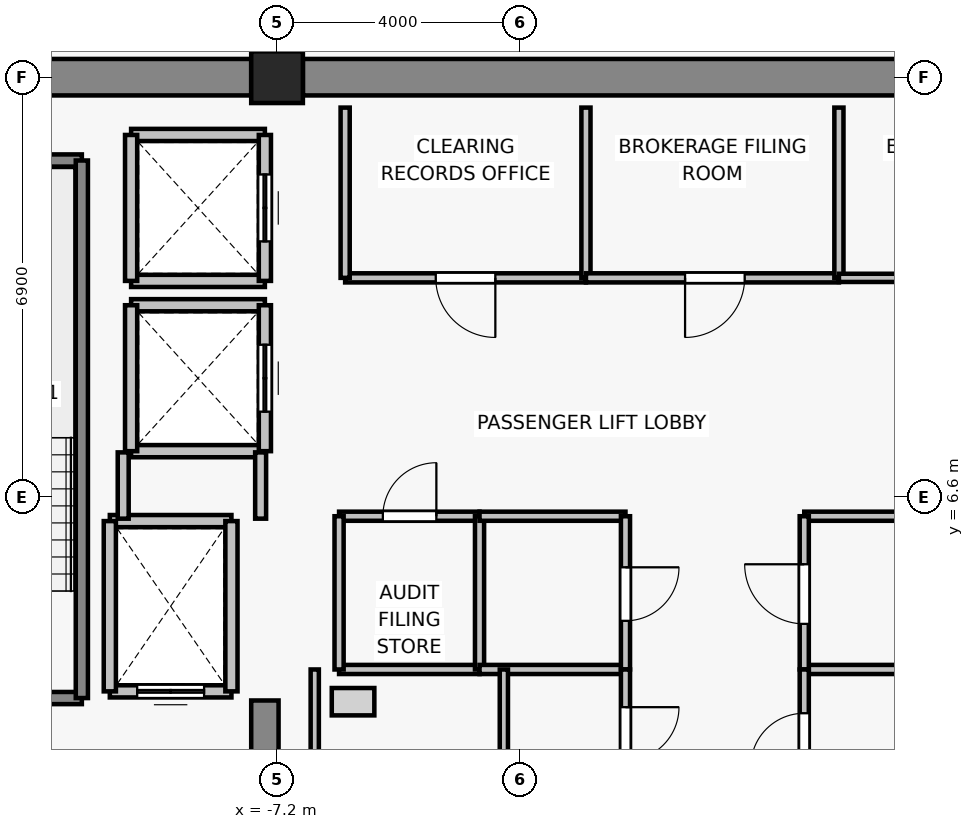
"""IFC4 building model, lengths in metres.
Left out: names, types, materials, properties, quantities, classifications, styles, units other than length and angle.
Written with IfcOpenShell. Run it as: python <this file> out.ifc"""

import sys

from ifc_helpers import new_model, si_unit, direction, frame, frame_2d, origin, origin_2d, place, context, subcontext, project, spatial, rectangle, extrude, source, transform, mapped, element, fill, save


model = new_model("IFC4")
c1 = context("Model", 3, precision=1e-05, world=origin(), true_north=direction((0.0, 1.0)))
c2 = subcontext(c1, "Body", "Model", "MODEL_VIEW")
j1 = project(units=[si_unit("LENGTHUNIT", "METRE"), si_unit("PLANEANGLEUNIT", "RADIAN")], contexts=[c1])
p1 = place(None, origin())
s1 = spatial("IfcSite", under=j1, at=p1, CompositionType="ELEMENT")
p2 = place(p1, origin())
s2 = spatial("IfcBuilding", under=s1, at=p2, CompositionType="ELEMENT")
p3 = place(p2, frame((0.0, 0.0, 225.4)))
s3 = spatial("IfcBuildingStorey", under=s2, at=p3, CompositionType="ELEMENT", Elevation=225.4)
p4 = place(p3, frame((-7.2, 13.5, 0.0), z_axis=(0.0, 0.0, 1.0), x_axis=(1.0, 0.0, 0.0)))
e1 = element("IfcColumn", 1, at=p4, inside=s3, PredefinedType="COLUMN", context=c2, shape_type="SweptSolid", body=[
    extrude(rectangle(XDim=0.85, YDim=0.85, at=origin_2d()), origin(), (0.0, 0.0, 1.0), 3.3),
])
p5 = place(p3, frame((-13.975, 13.5, 0.0), z_axis=(0.0, 0.0, 1.0), x_axis=(1.0, 0.0, 0.0)))
e2 = element("IfcWall", 2, at=p5, inside=s3, PredefinedType="SHEAR", context=c2, shape_type="SweptSolid", body=[
    extrude(rectangle(XDim=6.35, YDim=0.6, at=frame_2d((3.175, 0.0))), origin(), (0.0, 0.0, 1.0), 3.075),
])
p6 = place(p3, frame((-6.775, 13.5, 0.0), z_axis=(0.0, 0.0, 1.0), x_axis=(1.0, 0.0, 0.0)))
e3 = element("IfcWall", 3, at=p6, inside=s3, PredefinedType="SHEAR", context=c2, shape_type="SweptSolid", body=[
    extrude(rectangle(XDim=13.55, YDim=0.6, at=frame_2d((6.775, 0.0))), origin(), (0.0, 0.0, 1.0), 3.075),
])
p7 = place(p3, frame((-7.4, -0.9, 0.0), z_axis=(0.0, 0.0, 1.0), x_axis=(0.0, 1.0, 0.0)))
e4 = element("IfcWall", 4, at=p7, inside=s3, PredefinedType="SHEAR", context=c2, shape_type="SweptSolid", body=[
    extrude(rectangle(XDim=4.15, YDim=0.45, at=frame_2d((2.075, 0.0))), origin(), (0.0, 0.0, 1.0), 3.075),
])
p8 = place(p3, frame((-7.95, 3.4, 0.0), z_axis=(0.0, 0.0, 1.0), x_axis=(-1.0, 0.0, 0.0)))
e5 = element("IfcWall", 5, at=p8, inside=s3, PredefinedType="SOLIDWALL", context=c2, shape_type="SweptSolid", body=[
    extrude(rectangle(XDim=2.0, YDim=0.2, at=frame_2d((1.0, 0.0))), origin(), (0.0, 0.0, 1.0), 3.075),
])
p9 = place(p8, frame((0.45, 0.0, 0.0)))
e6 = element("IfcOpeningElement", 6, at=p9, cuts=e5, PredefinedType="OPENING", context=c2, shape_type="SweptSolid", body=[
    extrude(rectangle(XDim=1.1, YDim=2.2, at=frame_2d((0.55, 1.1))), frame((0.0, 0.11, 0.0), z_axis=(0.0, -1.0, 0.0), x_axis=(1.0, 0.0, 0.0)), (0.0, 0.0, 1.0), 0.22),
])
p10 = place(p3, frame((-9.95, 6.2, 0.0), z_axis=(0.0, 0.0, 1.0), x_axis=(1.0, 0.0, 0.0)))
e7 = element("IfcWall", 7, at=p10, inside=s3, PredefinedType="SOLIDWALL", context=c2, shape_type="SweptSolid", body=[
    extrude(rectangle(XDim=2.0, YDim=0.2, at=frame_2d((1.0, 0.0))), origin(), (0.0, 0.0, 1.0), 3.075),
])
for number, where, z_axis, x_axis in (
    (8, (-9.95, 3.4, 0.0), (0.0, 0.0, 1.0), (0.0, 1.0, 0.0)),
    (9, (-7.95, 6.2, 0.0), (0.0, 0.0, 1.0), (0.0, -1.0, 0.0)),
):
    element("IfcWall", number, at=place(p3, frame(where, z_axis=z_axis, x_axis=x_axis)), inside=s3, PredefinedType="SOLIDWALL", context=c2, shape_type="SweptSolid", body=[
        extrude(rectangle(XDim=2.8, YDim=0.2, at=frame_2d((1.4, 0.0))), origin(), (0.0, 0.0, 1.0), 3.075),
    ])
for number, where, z_axis, x_axis in (
    (10, (-7.4, 7.35, 0.0), (0.0, 0.0, 1.0), (-1.0, 0.0, 0.0)),
    (11, (-9.6, 9.75, 0.0), (0.0, 0.0, 1.0), (1.0, 0.0, 0.0)),
):
    element("IfcWall", number, at=place(p3, frame(where, z_axis=z_axis, x_axis=x_axis)), inside=s3, PredefinedType="SOLIDWALL", context=c2, shape_type="SweptSolid", body=[
        extrude(rectangle(XDim=2.2, YDim=0.2, at=frame_2d((1.1, 0.0))), origin(), (0.0, 0.0, 1.0), 2.615),
    ])
p11 = place(p3, frame((-9.6, 7.35, 0.0), z_axis=(0.0, 0.0, 1.0), x_axis=(0.0, 1.0, 0.0)))
e12 = element("IfcWall", 12, at=p11, inside=s3, PredefinedType="SOLIDWALL", context=c2, shape_type="SweptSolid", body=[
    extrude(rectangle(XDim=2.4, YDim=0.2, at=frame_2d((1.2, 0.0))), origin(), (0.0, 0.0, 1.0), 3.075),
])
p12 = place(p3, frame((-7.4, 9.75, 0.0), z_axis=(0.0, 0.0, 1.0), x_axis=(0.0, -1.0, 0.0)))
e13 = element("IfcWall", 13, at=p12, inside=s3, PredefinedType="SOLIDWALL", context=c2, shape_type="SweptSolid", body=[
    extrude(rectangle(XDim=2.4, YDim=0.2, at=frame_2d((1.2, 0.0))), origin(), (0.0, 0.0, 1.0), 2.615),
])
p13 = place(p12, frame((0.65, 0.0, 0.0)))
e14 = element("IfcOpeningElement", 14, at=p13, cuts=e13, PredefinedType="OPENING", context=c2, shape_type="SweptSolid", body=[
    extrude(rectangle(XDim=1.1, YDim=2.2, at=frame_2d((0.55, 1.1))), frame((0.0, 0.11, 0.0), z_axis=(0.0, -1.0, 0.0), x_axis=(1.0, 0.0, 0.0)), (0.0, 0.0, 1.0), 0.22),
])
for number, where, z_axis, x_axis in (
    (15, (-7.4, 10.15, 0.0), (0.0, 0.0, 1.0), (-1.0, 0.0, 0.0)),
    (16, (-9.6, 12.55, 0.0), (0.0, 0.0, 1.0), (1.0, 0.0, 0.0)),
):
    element("IfcWall", number, at=place(p3, frame(where, z_axis=z_axis, x_axis=x_axis)), inside=s3, PredefinedType="SOLIDWALL", context=c2, shape_type="SweptSolid", body=[
        extrude(rectangle(XDim=2.2, YDim=0.2, at=frame_2d((1.1, 0.0))), origin(), (0.0, 0.0, 1.0), 2.615),
    ])
p14 = place(p3, frame((-9.6, 10.15, 0.0), z_axis=(0.0, 0.0, 1.0), x_axis=(0.0, 1.0, 0.0)))
e17 = element("IfcWall", 17, at=p14, inside=s3, PredefinedType="SOLIDWALL", context=c2, shape_type="SweptSolid", body=[
    extrude(rectangle(XDim=2.4, YDim=0.2, at=frame_2d((1.2, 0.0))), origin(), (0.0, 0.0, 1.0), 3.075),
])
p15 = place(p3, frame((-7.4, 12.55, 0.0), z_axis=(0.0, 0.0, 1.0), x_axis=(0.0, -1.0, 0.0)))
e18 = element("IfcWall", 18, at=p15, inside=s3, PredefinedType="SOLIDWALL", context=c2, shape_type="SweptSolid", body=[
    extrude(rectangle(XDim=2.4, YDim=0.2, at=frame_2d((1.2, 0.0))), origin(), (0.0, 0.0, 1.0), 2.615),
])
p16 = place(p15, frame((0.65, 0.0, 0.0)))
e19 = element("IfcOpeningElement", 19, at=p16, cuts=e18, PredefinedType="OPENING", context=c2, shape_type="SweptSolid", body=[
    extrude(rectangle(XDim=1.1, YDim=2.2, at=frame_2d((0.55, 1.1))), frame((0.0, 0.11, 0.0), z_axis=(0.0, -1.0, 0.0), x_axis=(1.0, 0.0, 0.0)), (0.0, 0.0, 1.0), 0.22),
])
p17 = place(p3, frame((-10.41, 3.29, 0.0), z_axis=(0.0, 0.0, 1.0), x_axis=(-1.0, 0.0, 0.0)))
e20 = element("IfcWall", 20, at=p17, inside=s3, PredefinedType="SOLIDWALL", context=c2, shape_type="SweptSolid", body=[
    extrude(rectangle(XDim=3.52, YDim=0.2, at=frame_2d((1.76, 0.0))), origin(), (0.0, 0.0, 1.0), 3.075),
])
p18 = place(p17, frame((1.165, 0.0, 0.0)))
e21 = element("IfcOpeningElement", 21, at=p18, cuts=e20, PredefinedType="OPENING", context=c2, shape_type="SweptSolid", body=[
    extrude(rectangle(XDim=1.15, YDim=2.15, at=frame_2d((0.575, 1.075))), frame((0.0, 0.11, 0.0), z_axis=(0.0, -1.0, 0.0), x_axis=(1.0, 0.0, 0.0)), (0.0, 0.0, 1.0), 0.22),
])
p19 = place(p3, frame((-13.93, 12.13, 0.0), z_axis=(0.0, 0.0, 1.0), x_axis=(1.0, 0.0, 0.0)))
e22 = element("IfcWall", 22, at=p19, inside=s3, PredefinedType="SOLIDWALL", context=c2, shape_type="SweptSolid", body=[
    extrude(rectangle(XDim=3.52, YDim=0.2, at=frame_2d((1.76, 0.0))), origin(), (0.0, 0.0, 1.0), 3.075),
])
p20 = place(p3, frame((-10.41, 12.13, 0.0), z_axis=(0.0, 0.0, 1.0), x_axis=(0.0, -1.0, 0.0)))
e23 = element("IfcWall", 23, at=p20, inside=s3, PredefinedType="SOLIDWALL", context=c2, shape_type="SweptSolid", body=[
    extrude(rectangle(XDim=8.84, YDim=0.2, at=frame_2d((4.42, 0.0))), origin(), (0.0, 0.0, 1.0), 3.075),
])
p21 = place(p3, frame((-9.73, 6.24, 0.0), z_axis=(0.0, 0.0, 1.0), x_axis=(0.0, 1.0, 0.0)))
e24 = element("IfcWall", 24, at=p21, inside=s3, PredefinedType="PARTITIONING", context=c2, shape_type="SweptSolid", body=[
    extrude(rectangle(XDim=1.09, YDim=0.18, at=frame_2d((0.545, 0.0))), origin(), (0.0, 0.0, 1.0), 3.075),
])
p22 = place(p3, frame((-7.47, 7.33, 0.0), z_axis=(0.0, 0.0, 1.0), x_axis=(0.0, -1.0, 0.0)))
e25 = element("IfcWall", 25, at=p22, inside=s3, PredefinedType="PARTITIONING", context=c2, shape_type="SweptSolid", body=[
    extrude(rectangle(XDim=1.09, YDim=0.18, at=frame_2d((0.545, 0.0))), origin(), (0.0, 0.0, 1.0), 2.615),
])
p23 = place(p3, frame((-2.12, 10.2, 0.0), z_axis=(0.0, 0.0, 1.0), x_axis=(-1.0, 0.0, 0.0)))
e26 = element("IfcWall", 26, at=p23, inside=s3, PredefinedType="PARTITIONING", context=c2, shape_type="SweptSolid", body=[
    extrude(rectangle(XDim=3.96, YDim=0.15, at=frame_2d((1.98, 0.0))), origin(), (0.0, 0.0, 1.0), 3.075),
])
p24 = place(p23, frame((1.49, 0.0, 0.0)))
e27 = element("IfcOpeningElement", 27, at=p24, cuts=e26, PredefinedType="OPENING", context=c2, shape_type="SweptSolid", body=[
    extrude(rectangle(XDim=0.98, YDim=2.15, at=frame_2d((0.49, 1.075))), frame((0.0, 0.085, 0.0), z_axis=(0.0, -1.0, 0.0), x_axis=(1.0, 0.0, 0.0)), (0.0, 0.0, 1.0), 0.17),
])
for number, where, z_axis, x_axis in (
    (28, (-6.08, 10.2, 0.0), (0.0, 0.0, 1.0), (0.0, 1.0, 0.0)),
    (29, (-2.12, 13.0, 0.0), (0.0, 0.0, 1.0), (0.0, -1.0, 0.0)),
):
    element("IfcWall", number, at=place(p3, frame(where, z_axis=z_axis, x_axis=x_axis)), inside=s3, PredefinedType="PARTITIONING", context=c2, shape_type="SweptSolid", body=[
        extrude(rectangle(XDim=2.8, YDim=0.15, at=frame_2d((1.4, 0.0))), origin(), (0.0, 0.0, 1.0), 3.075),
    ])
p25 = place(p3, frame((2.04, 10.2, 0.0), z_axis=(0.0, 0.0, 1.0), x_axis=(-1.0, 0.0, 0.0)))
e30 = element("IfcWall", 30, at=p25, inside=s3, PredefinedType="PARTITIONING", context=c2, shape_type="SweptSolid", body=[
    extrude(rectangle(XDim=4.16, YDim=0.15, at=frame_2d((2.08, 0.0))), origin(), (0.0, 0.0, 1.0), 3.075),
])
p26 = place(p25, frame((1.55, 0.0, 0.0)))
e31 = element("IfcOpeningElement", 31, at=p26, cuts=e30, PredefinedType="OPENING", context=c2, shape_type="SweptSolid", body=[
    extrude(rectangle(XDim=0.98, YDim=2.15, at=frame_2d((0.49, 1.075))), frame((0.0, 0.085, 0.0), z_axis=(0.0, -1.0, 0.0), x_axis=(1.0, 0.0, 0.0)), (0.0, 0.0, 1.0), 0.17),
])
p27 = place(p3, frame((2.04, 13.0, 0.0), z_axis=(0.0, 0.0, 1.0), x_axis=(0.0, -1.0, 0.0)))
e32 = element("IfcWall", 32, at=p27, inside=s3, PredefinedType="PARTITIONING", context=c2, shape_type="SweptSolid", body=[
    extrude(rectangle(XDim=2.8, YDim=0.15, at=frame_2d((1.4, 0.0))), origin(), (0.0, 0.0, 1.0), 3.075),
])
p28 = place(p3, frame((6.08, 10.2, 0.0), z_axis=(0.0, 0.0, 1.0), x_axis=(-1.0, 0.0, 0.0)))
e33 = element("IfcWall", 33, at=p28, inside=s3, PredefinedType="PARTITIONING", context=c2, shape_type="SweptSolid", body=[
    extrude(rectangle(XDim=4.04, YDim=0.135, at=frame_2d((2.02, 0.0))), origin(), (0.0, 0.0, 1.0), 3.075),
])
p29 = place(p28, frame((1.53, 0.0, 0.0)))
e34 = element("IfcOpeningElement", 34, at=p29, cuts=e33, PredefinedType="OPENING", context=c2, shape_type="SweptSolid", body=[
    extrude(rectangle(XDim=0.98, YDim=2.15, at=frame_2d((0.49, 1.075))), frame((0.0, 0.077, 0.0), z_axis=(0.0, -1.0, 0.0), x_axis=(1.0, 0.0, 0.0)), (0.0, 0.0, 1.0), 0.155),
])
p30 = place(p3, frame((-3.87, 3.76, 0.0), z_axis=(0.0, 0.0, 1.0), x_axis=(-1.0, 0.0, 0.0)))
e35 = element("IfcWall", 35, at=p30, inside=s3, PredefinedType="PARTITIONING", context=c2, shape_type="SweptSolid", body=[
    extrude(rectangle(XDim=2.31, YDim=0.15, at=frame_2d((1.155, 0.0))), origin(), (0.0, 0.0, 1.0), 3.075),
])
p31 = place(p3, frame((-6.18, 6.28, 0.0), z_axis=(0.0, 0.0, 1.0), x_axis=(1.0, 0.0, 0.0)))
e36 = element("IfcWall", 36, at=p31, inside=s3, PredefinedType="PARTITIONING", context=c2, shape_type="SweptSolid", body=[
    extrude(rectangle(XDim=2.31, YDim=0.15, at=frame_2d((1.155, 0.0))), origin(), (0.0, 0.0, 1.0), 3.075),
])
p32 = place(p31, frame((0.72, 0.0, 0.0)))
e37 = element("IfcOpeningElement", 37, at=p32, cuts=e36, PredefinedType="OPENING", context=c2, shape_type="SweptSolid", body=[
    extrude(rectangle(XDim=0.88, YDim=2.1, at=frame_2d((0.44, 1.05))), frame((0.0, 0.085, 0.0), z_axis=(0.0, -1.0, 0.0), x_axis=(1.0, 0.0, 0.0)), (0.0, 0.0, 1.0), 0.17),
])
for number, where, z_axis, x_axis in (
    (38, (-6.18, 3.76, 0.0), (0.0, 0.0, 1.0), (0.0, 1.0, 0.0)),
    (39, (-3.87, 6.28, 0.0), (0.0, 0.0, 1.0), (0.0, -1.0, 0.0)),
):
    element("IfcWall", number, at=place(p3, frame(where, z_axis=z_axis, x_axis=x_axis)), inside=s3, PredefinedType="PARTITIONING", context=c2, shape_type="SweptSolid", body=[
        extrude(rectangle(XDim=2.52, YDim=0.15, at=frame_2d((1.26, 0.0))), origin(), (0.0, 0.0, 1.0), 3.075),
    ])
for number, where, z_axis, x_axis in (
    (40, (-1.47, 3.76, 0.0), (0.0, 0.0, 1.0), (-1.0, 0.0, 0.0)),
    (41, (-3.87, 6.28, 0.0), (0.0, 0.0, 1.0), (1.0, 0.0, 0.0)),
):
    element("IfcWall", number, at=place(p3, frame(where, z_axis=z_axis, x_axis=x_axis)), inside=s3, PredefinedType="PARTITIONING", context=c2, shape_type="SweptSolid", body=[
        extrude(rectangle(XDim=2.4, YDim=0.15, at=frame_2d((1.2, 0.0))), origin(), (0.0, 0.0, 1.0), 3.075),
    ])
p33 = place(p3, frame((-1.47, 6.28, 0.0), z_axis=(0.0, 0.0, 1.0), x_axis=(0.0, -1.0, 0.0)))
e42 = element("IfcWall", 42, at=p33, inside=s3, PredefinedType="PARTITIONING", context=c2, shape_type="SweptSolid", body=[
    extrude(rectangle(XDim=2.52, YDim=0.15, at=frame_2d((1.26, 0.0))), origin(), (0.0, 0.0, 1.0), 3.075),
])
p34 = place(p33, frame((0.84, 0.0, 0.0)))
e43 = element("IfcOpeningElement", 43, at=p34, cuts=e42, PredefinedType="OPENING", context=c2, shape_type="SweptSolid", body=[
    extrude(rectangle(XDim=0.88, YDim=2.1, at=frame_2d((0.44, 1.05))), frame((0.0, 0.085, 0.0), z_axis=(0.0, -1.0, 0.0), x_axis=(1.0, 0.0, 0.0)), (0.0, 0.0, 1.0), 0.17),
])
for number, where, z_axis, x_axis in (
    (44, (6.38, 3.76, 0.0), (0.0, 0.0, 1.0), (-1.0, 0.0, 0.0)),
    (45, (1.47, 6.28, 0.0), (0.0, 0.0, 1.0), (1.0, 0.0, 0.0)),
):
    element("IfcWall", number, at=place(p3, frame(where, z_axis=z_axis, x_axis=x_axis)), inside=s3, PredefinedType="PARTITIONING", context=c2, shape_type="SweptSolid", body=[
        extrude(rectangle(XDim=4.91, YDim=0.15, at=frame_2d((2.455, 0.0))), origin(), (0.0, 0.0, 1.0), 3.075),
    ])
p35 = place(p3, frame((1.47, 3.76, 0.0), z_axis=(0.0, 0.0, 1.0), x_axis=(0.0, 1.0, 0.0)))
e46 = element("IfcWall", 46, at=p35, inside=s3, PredefinedType="PARTITIONING", context=c2, shape_type="SweptSolid", body=[
    extrude(rectangle(XDim=2.52, YDim=0.15, at=frame_2d((1.26, 0.0))), origin(), (0.0, 0.0, 1.0), 3.075),
])
p36 = place(p35, frame((0.75, 0.0, 0.0)))
e47 = element("IfcOpeningElement", 47, at=p36, cuts=e46, PredefinedType="OPENING", context=c2, shape_type="SweptSolid", body=[
    extrude(rectangle(XDim=0.98, YDim=2.15, at=frame_2d((0.49, 1.075))), frame((0.0, 0.085, 0.0), z_axis=(0.0, -1.0, 0.0), x_axis=(1.0, 0.0, 0.0)), (0.0, 0.0, 1.0), 0.17),
])
for number, where, z_axis, x_axis in (
    (48, (-6.58, -0.73, 0.0), (0.0, 0.0, 1.0), (0.0, 1.0, 0.0)),
    (49, (-3.47, 3.76, 0.0), (0.0, 0.0, 1.0), (0.0, -1.0, 0.0)),
):
    element("IfcWall", number, at=place(p3, frame(where, z_axis=z_axis, x_axis=x_axis)), inside=s3, PredefinedType="PARTITIONING", context=c2, shape_type="SweptSolid", body=[
        extrude(rectangle(XDim=4.49, YDim=0.135, at=frame_2d((2.245, 0.0))), origin(), (0.0, 0.0, 1.0), 3.075),
    ])
p37 = place(p3, frame((-1.47, 3.76, 0.0), z_axis=(0.0, 0.0, 1.0), x_axis=(0.0, -1.0, 0.0)))
e50 = element("IfcWall", 50, at=p37, inside=s3, PredefinedType="PARTITIONING", context=c2, shape_type="SweptSolid", body=[
    extrude(rectangle(XDim=2.13, YDim=0.15, at=frame_2d((1.065, 0.0))), origin(), (0.0, 0.0, 1.0), 3.075),
])
p38 = place(p37, frame((0.62, 0.0, 0.0)))
e51 = element("IfcOpeningElement", 51, at=p38, cuts=e50, PredefinedType="OPENING", context=c2, shape_type="SweptSolid", body=[
    extrude(rectangle(XDim=0.88, YDim=2.1, at=frame_2d((0.44, 1.05))), frame((0.0, 0.085, 0.0), z_axis=(0.0, -1.0, 0.0), x_axis=(1.0, 0.0, 0.0)), (0.0, 0.0, 1.0), 0.17),
])
p39 = place(p3, frame((1.47, 1.43, 0.0), z_axis=(0.0, 0.0, 1.0), x_axis=(0.0, 1.0, 0.0)))
e52 = element("IfcWall", 52, at=p39, inside=s3, PredefinedType="PARTITIONING", context=c2, shape_type="SweptSolid", body=[
    extrude(rectangle(XDim=2.33, YDim=0.15, at=frame_2d((1.165, 0.0))), origin(), (0.0, 0.0, 1.0), 3.075),
])
p40 = place(p39, frame((0.73, 0.0, 0.0)))
e53 = element("IfcOpeningElement", 53, at=p40, cuts=e52, PredefinedType="OPENING", context=c2, shape_type="SweptSolid", body=[
    extrude(rectangle(XDim=0.88, YDim=2.15, at=frame_2d((0.44, 1.075))), frame((0.0, 0.085, 0.0), z_axis=(0.0, -1.0, 0.0), x_axis=(1.0, 0.0, 0.0)), (0.0, 0.0, 1.0), 0.17),
])
m1 = source(origin(), c2, "Body", "SweptSolid", [
    extrude(rectangle(XDim=1.1, YDim=2.2, at=frame_2d((0.55, 1.1))), frame((0.0, 0.025, 0.0), z_axis=(0.0, -1.0, 0.0), x_axis=(1.0, 0.0, 0.0)), (0.0, 0.0, 1.0), 0.05),
])
p41 = place(p9, origin())
e54 = element("IfcDoor", 54, at=p41, inside=s3, OperationType="DOUBLE_DOOR_SLIDING", PredefinedType="DOOR", context=c2, shape_type="MappedRepresentation", body=[
    mapped(m1, transform((0.0, 0.0, 0.0), x_axis=(1.0, 0.0, 0.0), y_axis=(0.0, 1.0, 0.0), z_axis=(0.0, 0.0, 1.0), scale=1.0)),
])
fill(e6, e54)
p42 = place(p13, origin())
e55 = element("IfcDoor", 55, at=p42, inside=s3, OperationType="DOUBLE_DOOR_SLIDING", PredefinedType="DOOR", context=c2, shape_type="MappedRepresentation", body=[
    mapped(m1, transform((0.0, 0.0, 0.0), x_axis=(1.0, 0.0, 0.0), y_axis=(0.0, 1.0, 0.0), z_axis=(0.0, 0.0, 1.0), scale=1.0)),
])
fill(e14, e55)
p43 = place(p16, origin())
e56 = element("IfcDoor", 56, at=p43, inside=s3, OperationType="DOUBLE_DOOR_SLIDING", PredefinedType="DOOR", context=c2, shape_type="MappedRepresentation", body=[
    mapped(m1, transform((0.0, 0.0, 0.0), x_axis=(1.0, 0.0, 0.0), y_axis=(0.0, 1.0, 0.0), z_axis=(0.0, 0.0, 1.0), scale=1.0)),
])
fill(e19, e56)
m2 = source(origin(), c2, "Body", "SweptSolid", [
    extrude(rectangle(XDim=0.98, YDim=2.15, at=frame_2d((0.49, 1.075))), frame((0.0, 0.025, 0.0), z_axis=(0.0, -1.0, 0.0), x_axis=(1.0, 0.0, 0.0)), (0.0, 0.0, 1.0), 0.05),
])
p44 = place(p24, origin())
e57 = element("IfcDoor", 57, at=p44, inside=s3, OperationType="SINGLE_SWING_LEFT", PredefinedType="DOOR", context=c2, shape_type="MappedRepresentation", body=[
    mapped(m2, transform((0.0, 0.0, 0.0), x_axis=(1.0, 0.0, 0.0), y_axis=(0.0, 1.0, 0.0), z_axis=(0.0, 0.0, 1.0), scale=1.0)),
])
fill(e27, e57)
p45 = place(p26, origin())
e58 = element("IfcDoor", 58, at=p45, inside=s3, OperationType="SINGLE_SWING_RIGHT", PredefinedType="DOOR", context=c2, shape_type="MappedRepresentation", body=[
    mapped(m2, transform((0.0, 0.0, 0.0), x_axis=(1.0, 0.0, 0.0), y_axis=(0.0, 1.0, 0.0), z_axis=(0.0, 0.0, 1.0), scale=1.0)),
])
fill(e31, e58)
m3 = source(origin(), c2, "Body", "SweptSolid", [
    extrude(rectangle(XDim=0.88, YDim=2.1, at=frame_2d((0.44, 1.05))), frame((0.0, 0.025, 0.0), z_axis=(0.0, -1.0, 0.0), x_axis=(1.0, 0.0, 0.0)), (0.0, 0.0, 1.0), 0.05),
])
p46 = place(p32, origin())
e59 = element("IfcDoor", 59, at=p46, inside=s3, OperationType="SINGLE_SWING_RIGHT", PredefinedType="DOOR", context=c2, shape_type="MappedRepresentation", body=[
    mapped(m3, transform((0.0, 0.0, 0.0), x_axis=(1.0, 0.0, 0.0), y_axis=(0.0, 1.0, 0.0), z_axis=(0.0, 0.0, 1.0), scale=1.0)),
])
fill(e37, e59)
p47 = place(p34, origin())
e60 = element("IfcDoor", 60, at=p47, inside=s3, OperationType="SINGLE_SWING_LEFT", PredefinedType="DOOR", context=c2, shape_type="MappedRepresentation", body=[
    mapped(m3, transform((0.0, 0.0, 0.0), x_axis=(1.0, 0.0, 0.0), y_axis=(0.0, 1.0, 0.0), z_axis=(0.0, 0.0, 1.0), scale=1.0)),
])
fill(e43, e60)
p48 = place(p36, origin())
e61 = element("IfcDoor", 61, at=p48, inside=s3, OperationType="SINGLE_SWING_RIGHT", PredefinedType="DOOR", context=c2, shape_type="MappedRepresentation", body=[
    mapped(m2, transform((0.0, 0.0, 0.0), x_axis=(1.0, 0.0, 0.0), y_axis=(0.0, 1.0, 0.0), z_axis=(0.0, 0.0, 1.0), scale=1.0)),
])
fill(e47, e61)
p49 = place(p38, origin())
e62 = element("IfcDoor", 62, at=p49, inside=s3, OperationType="SINGLE_SWING_LEFT", PredefinedType="DOOR", context=c2, shape_type="MappedRepresentation", body=[
    mapped(m3, transform((0.0, 0.0, 0.0), x_axis=(1.0, 0.0, 0.0), y_axis=(0.0, 1.0, 0.0), z_axis=(0.0, 0.0, 1.0), scale=1.0)),
])
fill(e51, e62)
m4 = source(origin(), c2, "Body", "SweptSolid", [
    extrude(rectangle(XDim=0.88, YDim=2.15, at=frame_2d((0.44, 1.075))), frame((0.0, 0.025, 0.0), z_axis=(0.0, -1.0, 0.0), x_axis=(1.0, 0.0, 0.0)), (0.0, 0.0, 1.0), 0.05),
])
p50 = place(p40, origin())
e63 = element("IfcDoor", 63, at=p50, inside=s3, OperationType="SINGLE_SWING_LEFT", PredefinedType="DOOR", context=c2, shape_type="MappedRepresentation", body=[
    mapped(m4, transform((0.0, 0.0, 0.0), x_axis=(1.0, 0.0, 0.0), y_axis=(0.0, 1.0, 0.0), z_axis=(0.0, 0.0, 1.0), scale=1.0)),
])
fill(e53, e63)
save(model, sys.argv[1])
